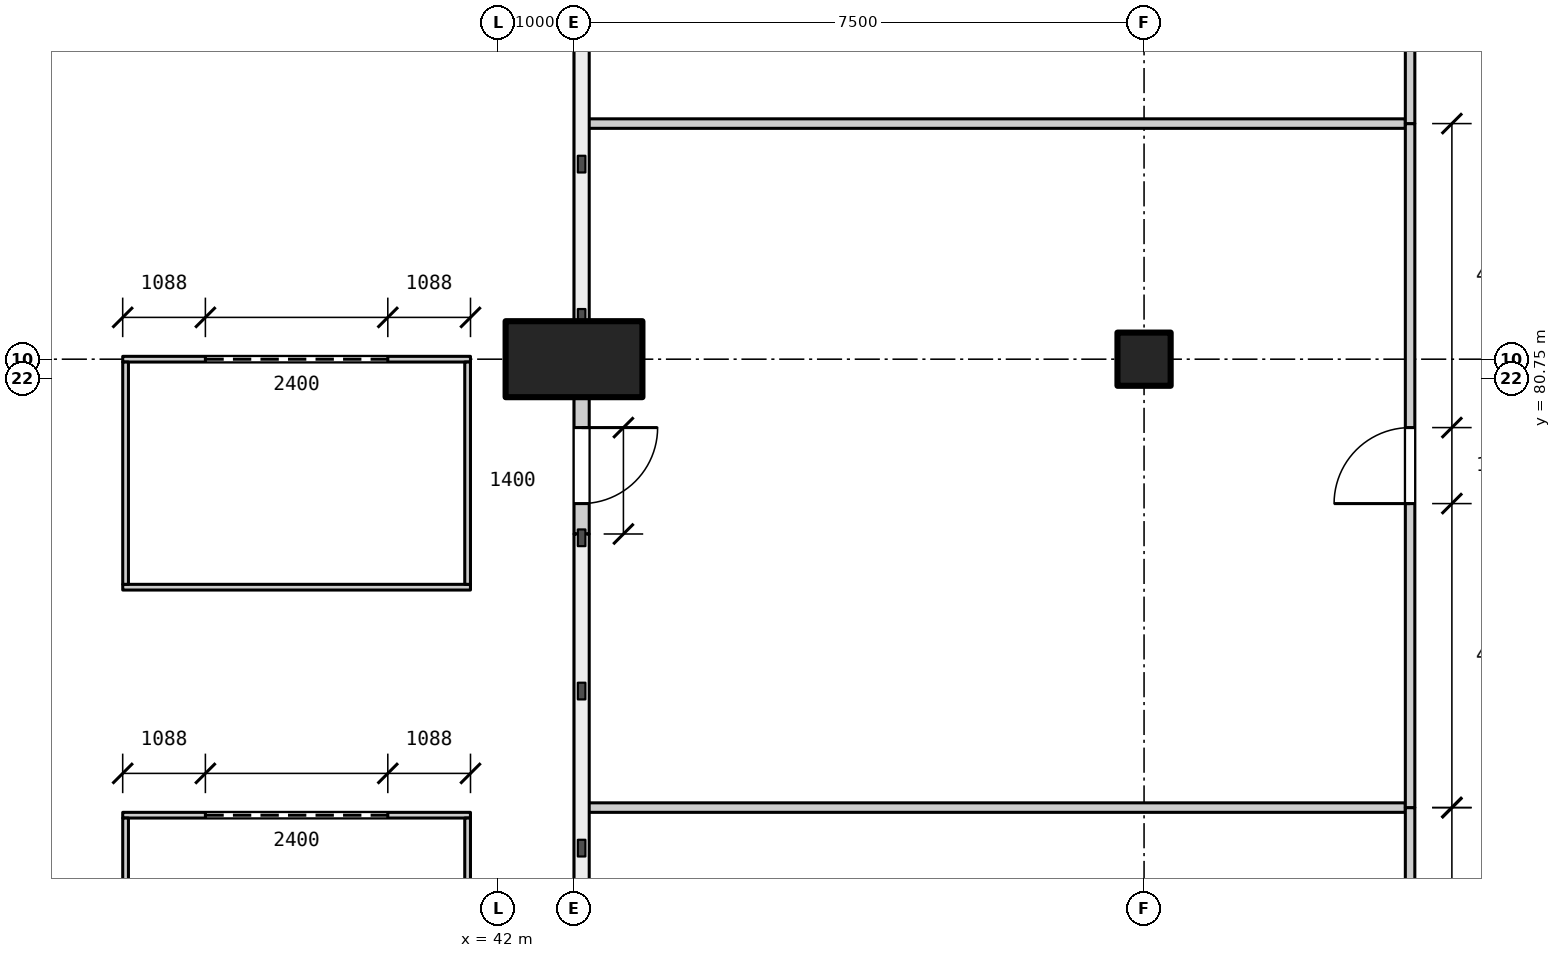
"""IFC4 building model, lengths in metres.
Left out: names, types, materials, properties, quantities, classifications, styles, units other than length and angle.
Written with IfcOpenShell. Run it as: python <this file> out.ifc"""

import sys

from ifc_helpers import new_model, si_unit, direction, frame, frame_2d, origin, origin_2d, place, context, subcontext, project, spatial, rectangle, extrude, element, fill, save


model = new_model("IFC4")
c1 = context("Model", 3, precision=1e-05, world=origin(), true_north=direction((0.0, 1.0)))
c2 = subcontext(c1, "Body", "Model", "MODEL_VIEW")
j1 = project(units=[si_unit("LENGTHUNIT", "METRE"), si_unit("PLANEANGLEUNIT", "RADIAN")], contexts=[c1])
p1 = place(None, origin())
s1 = spatial("IfcSite", under=j1, at=p1, CompositionType="ELEMENT")
p2 = place(p1, origin())
s2 = spatial("IfcBuilding", under=s1, at=p2, CompositionType="ELEMENT")
p3 = place(p2, origin())
s3 = spatial("IfcBuildingStorey", under=s2, at=p3, CompositionType="ELEMENT", Elevation=0.0)
p4 = place(p3, frame((50.5, 81.0, 0.0), z_axis=(0.0, 0.0, 1.0), x_axis=(1.0, 0.0, 0.0)))
e1 = element("IfcColumn", 1, at=p4, inside=s3, PredefinedType="COLUMN", context=c2, shape_type="SweptSolid", body=[
    extrude(rectangle(XDim=0.7, YDim=0.7, at=origin_2d()), origin(), (0.0, 0.0, 1.0), 6.0),
])
p5 = place(p3, frame((43.0, 81.0, 0.0), z_axis=(0.0, 0.0, 1.0), x_axis=(1.0, 0.0, 0.0)))
e2 = element("IfcColumn", 2, at=p5, inside=s3, PredefinedType="COLUMN", context=c2, shape_type="SweptSolid", body=[
    extrude(rectangle(XDim=1.8, YDim=1.0, at=origin_2d()), origin(), (0.0, 0.0, 1.0), 6.0),
])
p6 = place(p3, frame((43.1, 78.7, 0.0), z_axis=(0.0, 0.0, 1.0), x_axis=(0.0, 1.0, 0.0)))
e3 = element("IfcWall", 3, at=p6, inside=s3, PredefinedType="PARTITIONING", context=c2, shape_type="SweptSolid", body=[
    extrude(rectangle(XDim=1.8, YDim=0.2, at=frame_2d((0.9, 0.0))), origin(), (0.0, 0.0, 1.0), 5.8),
])
p7 = place(p6, frame((0.4, 0.0, 0.0)))
e4 = element("IfcOpeningElement", 4, at=p7, cuts=e3, PredefinedType="OPENING", context=c2, shape_type="SweptSolid", body=[
    extrude(rectangle(XDim=1.0, YDim=2.4, at=frame_2d((0.5, 1.2))), frame((0.0, 0.11, 0.0), z_axis=(0.0, -1.0, 0.0), x_axis=(1.0, 0.0, 0.0)), (0.0, 0.0, 1.0), 0.22),
])
p8 = place(p3, frame((37.062, 75.0, 0.0), z_axis=(0.0, 0.0, 1.0), x_axis=(1.0, 0.0, 0.0)))
e5 = element("IfcWall", 5, at=p8, inside=s3, PredefinedType="PARTITIONING", context=c2, shape_type="SweptSolid", body=[
    extrude(rectangle(XDim=4.575, YDim=0.075, at=frame_2d((2.288, 0.0))), origin(), (0.0, 0.0, 1.0), 3.0),
])
p9 = place(p8, frame((1.087, 0.0, 0.0)))
e6 = element("IfcOpeningElement", 6, at=p9, cuts=e5, PredefinedType="OPENING", context=c2, shape_type="SweptSolid", body=[
    extrude(rectangle(XDim=2.4, YDim=2.4, at=frame_2d((1.2, 1.2))), frame((0.0, 0.047, 0.0), z_axis=(0.0, -1.0, 0.0), x_axis=(1.0, 0.0, 0.0)), (0.0, 0.0, 1.0), 0.095),
])
p10 = place(p3, frame((43.1, 75.1, 0.0), z_axis=(0.0, 0.0, 1.0), x_axis=(1.0, 0.0, 0.0)))
e7 = element("IfcWall", 7, at=p10, inside=s3, PredefinedType="PARTITIONING", context=c2, shape_type="SweptSolid", body=[
    extrude(rectangle(XDim=10.837, YDim=0.125, at=frame_2d((5.419, 0.0))), origin(), (0.0, 0.0, 1.0), 5.8),
])
p11 = place(p3, frame((37.062, 78.0, 0.0), z_axis=(0.0, 0.0, 1.0), x_axis=(1.0, 0.0, 0.0)))
e8 = element("IfcWall", 8, at=p11, inside=s3, PredefinedType="PARTITIONING", context=c2, shape_type="SweptSolid", body=[
    extrude(rectangle(XDim=4.575, YDim=0.075, at=frame_2d((2.288, 0.0))), origin(), (0.0, 0.0, 1.0), 3.0),
])
p12 = place(p3, frame((37.062, 81.0, 0.0), z_axis=(0.0, 0.0, 1.0), x_axis=(1.0, 0.0, 0.0)))
e9 = element("IfcWall", 9, at=p12, inside=s3, PredefinedType="PARTITIONING", context=c2, shape_type="SweptSolid", body=[
    extrude(rectangle(XDim=4.575, YDim=0.075, at=frame_2d((2.288, 0.0))), origin(), (0.0, 0.0, 1.0), 3.0),
])
p13 = place(p12, frame((1.087, 0.0, 0.0)))
e10 = element("IfcOpeningElement", 10, at=p13, cuts=e9, PredefinedType="OPENING", context=c2, shape_type="SweptSolid", body=[
    extrude(rectangle(XDim=2.4, YDim=2.4, at=frame_2d((1.2, 1.2))), frame((0.0, 0.047, 0.0), z_axis=(0.0, -1.0, 0.0), x_axis=(1.0, 0.0, 0.0)), (0.0, 0.0, 1.0), 0.095),
])
p14 = place(p3, frame((43.1, 84.1, 0.0), z_axis=(0.0, 0.0, 1.0), x_axis=(1.0, 0.0, 0.0)))
e11 = element("IfcWall", 11, at=p14, inside=s3, PredefinedType="PARTITIONING", context=c2, shape_type="SweptSolid", body=[
    extrude(rectangle(XDim=10.837, YDim=0.125, at=frame_2d((5.419, 0.0))), origin(), (0.0, 0.0, 1.0), 5.8),
])
p15 = place(p3, frame((37.1, 72.0, 0.0), z_axis=(0.0, 0.0, 1.0), x_axis=(0.0, 1.0, 0.0)))
e12 = element("IfcWall", 12, at=p15, inside=s3, PredefinedType="PARTITIONING", context=c2, shape_type="SweptSolid", body=[
    extrude(rectangle(XDim=2.962, YDim=0.075, at=frame_2d((1.481, 0.0))), origin(), (0.0, 0.0, 1.0), 3.0),
])
p16 = place(p3, frame((37.1, 78.038, 0.0), z_axis=(0.0, 0.0, 1.0), x_axis=(0.0, 1.0, 0.0)))
e13 = element("IfcWall", 13, at=p16, inside=s3, PredefinedType="PARTITIONING", context=c2, shape_type="SweptSolid", body=[
    extrude(rectangle(XDim=2.925, YDim=0.075, at=frame_2d((1.462, 0.0))), origin(), (0.0, 0.0, 1.0), 3.0),
])
p17 = place(p3, frame((41.6, 72.0, 0.0), z_axis=(0.0, 0.0, 1.0), x_axis=(0.0, 1.0, 0.0)))
e14 = element("IfcWall", 14, at=p17, inside=s3, PredefinedType="PARTITIONING", context=c2, shape_type="SweptSolid", body=[
    extrude(rectangle(XDim=2.962, YDim=0.075, at=frame_2d((1.481, 0.0))), origin(), (0.0, 0.0, 1.0), 3.0),
])
p18 = place(p3, frame((41.6, 78.038, 0.0), z_axis=(0.0, 0.0, 1.0), x_axis=(0.0, 1.0, 0.0)))
e15 = element("IfcWall", 15, at=p18, inside=s3, PredefinedType="PARTITIONING", context=c2, shape_type="SweptSolid", body=[
    extrude(rectangle(XDim=2.925, YDim=0.075, at=frame_2d((1.462, 0.0))), origin(), (0.0, 0.0, 1.0), 3.0),
])
p19 = place(p3, frame((54.0, 66.1, 0.0), z_axis=(0.0, 0.0, 1.0), x_axis=(0.0, 1.0, 0.0)))
e16 = element("IfcWall", 16, at=p19, inside=s3, PredefinedType="PARTITIONING", context=c2, shape_type="SweptSolid", body=[
    extrude(rectangle(XDim=9.0, YDim=0.125, at=frame_2d((4.5, 0.0))), origin(), (0.0, 0.0, 1.0), 5.05),
])
p20 = place(p19, frame((4.0, 0.0, 0.0)))
e17 = element("IfcOpeningElement", 17, at=p20, cuts=e16, PredefinedType="OPENING", context=c2, shape_type="SweptSolid", body=[
    extrude(rectangle(XDim=1.0, YDim=2.1, at=frame_2d((0.5, 1.05))), frame((0.0, 0.073, 0.0), z_axis=(0.0, -1.0, 0.0), x_axis=(1.0, 0.0, 0.0)), (0.0, 0.0, 1.0), 0.145),
])
p21 = place(p3, frame((54.0, 75.1, 0.0), z_axis=(0.0, 0.0, 1.0), x_axis=(0.0, 1.0, 0.0)))
e18 = element("IfcWall", 18, at=p21, inside=s3, PredefinedType="PARTITIONING", context=c2, shape_type="SweptSolid", body=[
    extrude(rectangle(XDim=9.0, YDim=0.125, at=frame_2d((4.5, 0.0))), origin(), (0.0, 0.0, 1.0), 5.05),
])
p22 = place(p21, frame((4.0, 0.0, 0.0)))
e19 = element("IfcOpeningElement", 19, at=p22, cuts=e18, PredefinedType="OPENING", context=c2, shape_type="SweptSolid", body=[
    extrude(rectangle(XDim=1.0, YDim=2.1, at=frame_2d((0.5, 1.05))), frame((0.0, 0.073, 0.0), z_axis=(0.0, -1.0, 0.0), x_axis=(1.0, 0.0, 0.0)), (0.0, 0.0, 1.0), 0.145),
])
p23 = place(p3, frame((54.0, 84.1, 0.0), z_axis=(0.0, 0.0, 1.0), x_axis=(0.0, 1.0, 0.0)))
e20 = element("IfcWall", 20, at=p23, inside=s3, PredefinedType="PARTITIONING", context=c2, shape_type="SweptSolid", body=[
    extrude(rectangle(XDim=4.837, YDim=0.125, at=frame_2d((2.419, 0.0))), origin(), (0.0, 0.0, 1.0), 5.05),
])
p24 = place(p7, frame((1.0, 0.0, 0.0), z_axis=(0.0, 0.0, 1.0), x_axis=(-1.0, 0.0, 0.0)))
e21 = element("IfcDoor", 21, at=p24, inside=s3, OperationType="SINGLE_SWING_LEFT", PredefinedType="DOOR", context=c2, shape_type="SweptSolid", body=[
    extrude(rectangle(XDim=1.0, YDim=2.4, at=frame_2d((0.5, 1.2))), frame((0.0, 0.025, 0.0), z_axis=(0.0, -1.0, 0.0), x_axis=(1.0, 0.0, 0.0)), (0.0, 0.0, 1.0), 0.05),
])
fill(e4, e21)
p25 = place(p9, origin())
e22 = element("IfcDoor", 22, at=p25, inside=s3, OperationType="ROLLINGUP", PredefinedType="DOOR", context=c2, shape_type="SweptSolid", body=[
    extrude(rectangle(XDim=2.4, YDim=2.4, at=frame_2d((1.2, 1.2))), frame((0.0, 0.025, 0.0), z_axis=(0.0, -1.0, 0.0), x_axis=(1.0, 0.0, 0.0)), (0.0, 0.0, 1.0), 0.05),
])
fill(e6, e22)
p26 = place(p22, origin())
e23 = element("IfcDoor", 23, at=p26, inside=s3, OperationType="SINGLE_SWING_LEFT", PredefinedType="DOOR", context=c2, shape_type="SweptSolid", body=[
    extrude(rectangle(XDim=1.0, YDim=2.1, at=frame_2d((0.5, 1.05))), frame((0.0, 0.025, 0.0), z_axis=(0.0, -1.0, 0.0), x_axis=(1.0, 0.0, 0.0)), (0.0, 0.0, 1.0), 0.05),
])
fill(e19, e23)
p27 = place(p13, origin())
e24 = element("IfcDoor", 24, at=p27, inside=s3, OperationType="ROLLINGUP", PredefinedType="DOOR", context=c2, shape_type="SweptSolid", body=[
    extrude(rectangle(XDim=2.4, YDim=2.4, at=frame_2d((1.2, 1.2))), frame((0.0, 0.025, 0.0), z_axis=(0.0, -1.0, 0.0), x_axis=(1.0, 0.0, 0.0)), (0.0, 0.0, 1.0), 0.05),
])
fill(e10, e24)
save(model, sys.argv[1])
